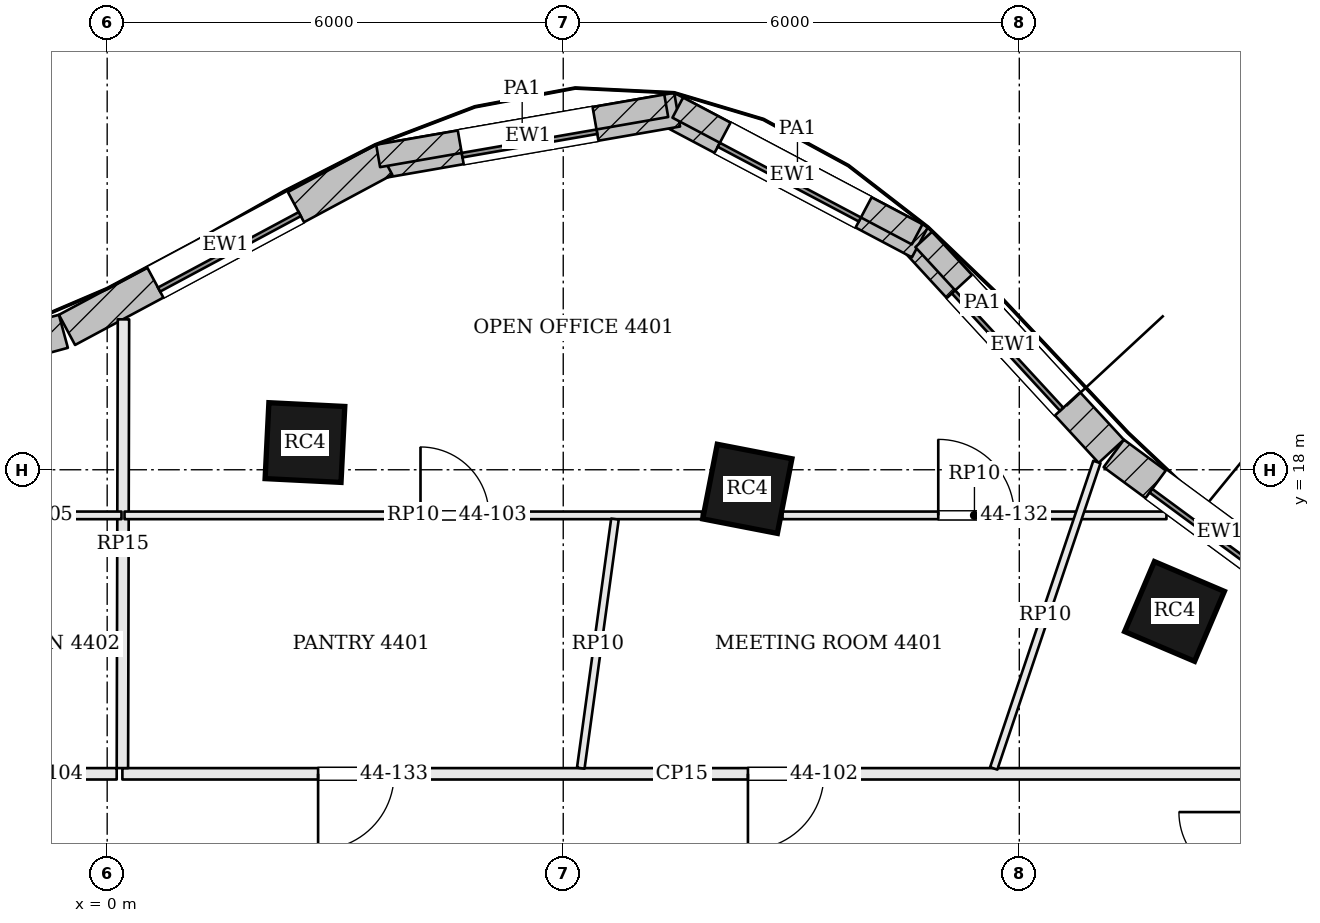
"""IFC4 building model, lengths in metres.
Left out: names, types, materials, properties, quantities, classifications, styles, units other than length and angle.
Written with IfcOpenShell. Run it as: python <this file> out.ifc"""

import sys

from ifc_helpers import new_model, si_unit, direction, frame, frame_2d, origin, origin_2d, place, context, subcontext, project, spatial, rectangle, extrude, element, fill, save


model = new_model("IFC4")
c1 = context("Model", 3, precision=1e-05, world=origin(), true_north=direction((0.0, 1.0)))
c2 = subcontext(c1, "Body", "Model", "MODEL_VIEW")
j1 = project(units=[si_unit("LENGTHUNIT", "METRE"), si_unit("PLANEANGLEUNIT", "RADIAN")], contexts=[c1])
p1 = place(None, origin())
s1 = spatial("IfcSite", under=j1, at=p1, CompositionType="ELEMENT")
p2 = place(p1, origin())
s2 = spatial("IfcBuilding", under=s1, at=p2, CompositionType="ELEMENT")
p3 = place(p2, frame((0.0, 0.0, 181.8)))
s3 = spatial("IfcBuildingStorey", under=s2, at=p3, CompositionType="ELEMENT", Elevation=181.8)
for number, where, z_axis, x_axis in (
    (1, (14.042, 16.136, 0.0), (0.0, 0.0, 1.0), (-0.92, 0.392, 0.0)),
    (2, (8.422, 17.749, 0.0), (0.0, 0.0, 1.0), (-0.982, 0.191, 0.0)),
    (3, (2.602, 18.358, 0.0), (0.0, 0.0, 1.0), (-0.999, 0.05, 0.0)),
):
    element("IfcColumn", number, at=place(p3, frame(where, z_axis=z_axis, x_axis=x_axis)), inside=s3, PredefinedType="COLUMN", context=c2, shape_type="SweptSolid", body=[
        extrude(rectangle(XDim=1.0, YDim=1.0, at=origin_2d()), origin(), (0.0, 0.0, 1.0), 3.9),
    ])
p4 = place(p3, frame((16.036, 16.158, 0.0), z_axis=(0.0, 0.0, 1.0), x_axis=(-0.805181432967, 0.593028549064, 0.0)))
e4 = element("IfcWall", 4, at=p4, inside=s3, PredefinedType="SOLIDWALL", context=c2, shape_type="SweptSolid", body=[
    extrude(rectangle(XDim=3.469, YDim=0.45, at=frame_2d((1.734, 0.0))), origin(), (0.0, 0.0, 1.0), 3.7),
])
p5 = place(p4, frame((0.684, 0.0, 0.9)))
e5 = element("IfcOpeningElement", 5, at=p5, cuts=e4, PredefinedType="OPENING", context=c2, shape_type="SweptSolid", body=[
    extrude(rectangle(XDim=2.1, YDim=2.3, at=frame_2d((1.05, 1.15))), frame((0.0, 0.235, 0.0), z_axis=(0.0, -1.0, 0.0), x_axis=(1.0, 0.0, 0.0)), (0.0, 0.0, 1.0), 0.47),
])
p6 = place(p3, frame((13.209, 18.243, 0.0), z_axis=(0.0, 0.0, 1.0), x_axis=(-0.677612152497, 0.735419452278, 0.0)))
e6 = element("IfcWall", 6, at=p6, inside=s3, PredefinedType="SOLIDWALL", context=c2, shape_type="SweptSolid", body=[
    extrude(rectangle(XDim=3.797, YDim=0.45, at=frame_2d((1.898, 0.0))), origin(), (0.0, 0.0, 1.0), 3.7),
])
p7 = place(p6, frame((0.848, 0.0, 0.9)))
e7 = element("IfcOpeningElement", 7, at=p7, cuts=e6, PredefinedType="OPENING", context=c2, shape_type="SweptSolid", body=[
    extrude(rectangle(XDim=2.1, YDim=2.3, at=frame_2d((1.05, 1.15))), frame((0.0, 0.235, 0.0), z_axis=(0.0, -1.0, 0.0), x_axis=(1.0, 0.0, 0.0)), (0.0, 0.0, 1.0), 0.47),
])
p8 = place(p3, frame((10.693, 20.993, 0.0), z_axis=(0.0, 0.0, 1.0), x_axis=(-0.883817790726, 0.46783128668, 0.0)))
e8 = element("IfcWall", 8, at=p8, inside=s3, PredefinedType="SOLIDWALL", context=c2, shape_type="SweptSolid", body=[
    extrude(rectangle(XDim=3.777, YDim=0.45, at=frame_2d((1.888, 0.0))), origin(), (0.0, 0.0, 1.0), 3.7),
])
p9 = place(p8, frame((0.838, 0.0, 0.9)))
e9 = element("IfcOpeningElement", 9, at=p9, cuts=e8, PredefinedType="OPENING", context=c2, shape_type="SweptSolid", body=[
    extrude(rectangle(XDim=2.1, YDim=2.3, at=frame_2d((1.05, 1.15))), frame((0.0, 0.235, 0.0), z_axis=(0.0, -1.0, 0.0), x_axis=(1.0, 0.0, 0.0)), (0.0, 0.0, 1.0), 0.47),
])
p10 = place(p3, frame((7.499, 22.737, 0.0), z_axis=(0.0, 0.0, 1.0), x_axis=(-0.98521220506, -0.171338585849, 0.0)))
e10 = element("IfcWall", 10, at=p10, inside=s3, PredefinedType="SOLIDWALL", context=c2, shape_type="SweptSolid", body=[
    extrude(rectangle(XDim=3.98, YDim=0.45, at=frame_2d((1.99, 0.0))), origin(), (0.0, 0.0, 1.0), 3.7),
])
p11 = place(p10, frame((1.09, 0.0, 0.9)))
e11 = element("IfcOpeningElement", 11, at=p11, cuts=e10, PredefinedType="OPENING", context=c2, shape_type="SweptSolid", body=[
    extrude(rectangle(XDim=1.8, YDim=2.3, at=frame_2d((0.9, 1.15))), frame((0.0, 0.235, 0.0), z_axis=(0.0, -1.0, 0.0), x_axis=(1.0, 0.0, 0.0)), (0.0, 0.0, 1.0), 0.47),
])
p12 = place(p3, frame((3.646, 22.079, 0.0), z_axis=(0.0, 0.0, 1.0), x_axis=(-0.881279133897, -0.472596115259, 0.0)))
e12 = element("IfcWall", 12, at=p12, inside=s3, PredefinedType="SOLIDWALL", context=c2, shape_type="SweptSolid", body=[
    extrude(rectangle(XDim=4.737, YDim=0.45, at=frame_2d((2.368, 0.0))), origin(), (0.0, 0.0, 1.0), 3.7),
])
p13 = place(p12, frame((1.318, 0.0, 0.9)))
e13 = element("IfcOpeningElement", 13, at=p13, cuts=e12, PredefinedType="OPENING", context=c2, shape_type="SweptSolid", body=[
    extrude(rectangle(XDim=2.1, YDim=2.3, at=frame_2d((1.05, 1.15))), frame((0.0, 0.235, 0.0), z_axis=(0.0, -1.0, 0.0), x_axis=(1.0, 0.0, 0.0)), (0.0, 0.0, 1.0), 0.47),
])
p14 = place(p3, frame((-0.576, 19.821, 0.0), z_axis=(0.0, 0.0, 1.0), x_axis=(-0.965009398019, -0.262215296532, 0.0)))
e14 = element("IfcWall", 14, at=p14, inside=s3, PredefinedType="SOLIDWALL", context=c2, shape_type="SweptSolid", body=[
    extrude(rectangle(XDim=2.565, YDim=0.45, at=frame_2d((1.283, 0.0))), origin(), (0.0, 0.0, 1.0), 3.7),
])
p15 = place(p14, frame((0.233, 0.0, 0.9)))
e15 = element("IfcOpeningElement", 15, at=p15, cuts=e14, PredefinedType="OPENING", context=c2, shape_type="SweptSolid", body=[
    extrude(rectangle(XDim=2.1, YDim=2.3, at=frame_2d((1.05, 1.15))), frame((0.0, 0.235, 0.0), z_axis=(0.0, -1.0, 0.0), x_axis=(1.0, 0.0, 0.0)), (0.0, 0.0, 1.0), 0.47),
])
p16 = place(p3, frame((12.288, 19.354, 3.9), z_axis=(0.0, 0.0, 1.0), x_axis=(-0.677603807485, 0.735427141246, 0.0)))
e16 = element("IfcWall", 16, at=p16, inside=s3, PredefinedType="PARAPET", context=c2, shape_type="SweptSolid", body=[
    extrude(rectangle(XDim=2.28, YDim=0.3, at=frame_2d((1.14, 0.0))), origin(), (0.0, 0.0, 1.0), 1.1),
])
p17 = place(p3, frame((10.656, 21.097, 3.9), z_axis=(0.0, 0.0, 1.0), x_axis=(-0.883797916666, 0.467868830439, 0.0)))
e17 = element("IfcWall", 17, at=p17, inside=s3, PredefinedType="PARAPET", context=c2, shape_type="SweptSolid", body=[
    extrude(rectangle(XDim=3.563, YDim=0.3, at=frame_2d((1.781, 0.0))), origin(), (0.0, 0.0, 1.0), 1.1),
])
p18 = place(p3, frame((7.355, 22.789, 3.9), z_axis=(0.0, 0.0, 1.0), x_axis=(-0.985201040548, -0.171402770404, 0.0)))
e18 = element("IfcWall", 18, at=p18, inside=s3, PredefinedType="PARAPET", context=c2, shape_type="SweptSolid", body=[
    extrude(rectangle(XDim=3.847, YDim=0.3, at=frame_2d((1.924, 0.0))), origin(), (0.0, 0.0, 1.0), 1.1),
])
p19 = place(p3, frame((14.925, 14.0, 0.0), z_axis=(0.0, 0.0, 1.0), x_axis=(-1.0, 0.0, 0.0)))
e19 = element("IfcWall", 19, at=p19, inside=s3, PredefinedType="PARTITIONING", context=c2, shape_type="SweptSolid", body=[
    extrude(rectangle(XDim=14.725, YDim=0.15, at=frame_2d((7.362, 0.0))), origin(), (0.0, 0.0, 1.0), 3.084),
])
p20 = place(p19, frame((5.495, 0.0, 0.0)))
e20 = element("IfcOpeningElement", 20, at=p20, cuts=e19, PredefinedType="OPENING", context=c2, shape_type="SweptSolid", body=[
    extrude(rectangle(XDim=1.0, YDim=2.4, at=frame_2d((0.5, 1.2))), frame((0.0, 0.085, 0.0), z_axis=(0.0, -1.0, 0.0), x_axis=(1.0, 0.0, 0.0)), (0.0, 0.0, 1.0), 0.17),
])
p21 = place(p19, frame((11.15, 0.0, 0.0)))
e21 = element("IfcOpeningElement", 21, at=p21, cuts=e19, PredefinedType="OPENING", context=c2, shape_type="SweptSolid", body=[
    extrude(rectangle(XDim=1.0, YDim=2.1, at=frame_2d((0.5, 1.05))), frame((0.0, 0.085, 0.0), z_axis=(0.0, -1.0, 0.0), x_axis=(1.0, 0.0, 0.0)), (0.0, 0.0, 1.0), 0.17),
])
p22 = place(p3, frame((0.214, 19.979, 0.0), z_axis=(0.0, 0.0, 1.0), x_axis=(-0.002357118586, -0.999997221992, 0.0)))
e22 = element("IfcWall", 22, at=p22, inside=s3, PredefinedType="PARTITIONING", context=c2, shape_type="SweptSolid", body=[
    extrude(rectangle(XDim=5.904, YDim=0.15, at=frame_2d((2.952, 0.0))), origin(), (0.0, 0.0, 1.0), 3.234),
])
p23 = place(p3, frame((0.125, 14.0, 0.0), z_axis=(0.0, 0.0, 1.0), x_axis=(-1.0, 0.0, 0.0)))
e23 = element("IfcWall", 23, at=p23, inside=s3, PredefinedType="PARTITIONING", context=c2, shape_type="SweptSolid", body=[
    extrude(rectangle(XDim=15.125, YDim=0.15, at=frame_2d((7.562, 0.0))), origin(), (0.0, 0.0, 1.0), 3.084),
])
p24 = place(p23, frame((0.888, 0.0, 0.0)))
e24 = element("IfcOpeningElement", 24, at=p24, cuts=e23, PredefinedType="OPENING", context=c2, shape_type="SweptSolid", body=[
    extrude(rectangle(XDim=1.0, YDim=2.1, at=frame_2d((0.5, 1.05))), frame((0.0, 0.085, 0.0), z_axis=(0.0, -1.0, 0.0), x_axis=(1.0, 0.0, 0.0)), (0.0, 0.0, 1.0), 0.17),
])
p25 = place(p23, frame((4.005, 0.0, 0.0)))
e25 = element("IfcOpeningElement", 25, at=p25, cuts=e23, PredefinedType="OPENING", context=c2, shape_type="SweptSolid", body=[
    extrude(rectangle(XDim=1.0, YDim=2.4, at=frame_2d((0.5, 1.2))), frame((0.0, 0.085, 0.0), z_axis=(0.0, -1.0, 0.0), x_axis=(1.0, 0.0, 0.0)), (0.0, 0.0, 1.0), 0.17),
])
p26 = place(p23, frame((7.307, 0.0, 0.0)))
e26 = element("IfcOpeningElement", 26, at=p26, cuts=e23, PredefinedType="OPENING", context=c2, shape_type="SweptSolid", body=[
    extrude(rectangle(XDim=1.0, YDim=2.4, at=frame_2d((0.5, 1.2))), frame((0.0, 0.085, 0.0), z_axis=(0.0, -1.0, 0.0), x_axis=(1.0, 0.0, 0.0)), (0.0, 0.0, 1.0), 0.17),
])
p27 = place(p3, frame((0.228, 17.4, 0.0), z_axis=(0.0, 0.0, 1.0), x_axis=(1.0, 0.0, 0.0)))
e27 = element("IfcWall", 27, at=p27, inside=s3, PredefinedType="PARTITIONING", context=c2, shape_type="SweptSolid", body=[
    extrude(rectangle(XDim=7.596, YDim=0.1, at=frame_2d((3.798, 0.0))), origin(), (0.0, 0.0, 1.0), 3.084),
])
p28 = place(p27, frame((3.894, 0.0, 0.0)))
e28 = element("IfcOpeningElement", 28, at=p28, cuts=e27, PredefinedType="OPENING", context=c2, shape_type="SweptSolid", body=[
    extrude(rectangle(XDim=0.9, YDim=2.1, at=frame_2d((0.45, 1.05))), frame((0.0, 0.06, 0.0), z_axis=(0.0, -1.0, 0.0), x_axis=(1.0, 0.0, 0.0)), (0.0, 0.0, 1.0), 0.12),
])
p29 = place(p3, frame((8.884, 17.4, 0.0), z_axis=(0.0, 0.0, 1.0), x_axis=(1.0, 0.0, 0.0)))
e29 = element("IfcWall", 29, at=p29, inside=s3, PredefinedType="PARTITIONING", context=c2, shape_type="SweptSolid", body=[
    extrude(rectangle(XDim=5.052, YDim=0.1, at=frame_2d((2.526, 0.0))), origin(), (0.0, 0.0, 1.0), 3.084),
])
p30 = place(p29, frame((2.05, 0.0, 0.0)))
e30 = element("IfcOpeningElement", 30, at=p30, cuts=e29, PredefinedType="OPENING", context=c2, shape_type="SweptSolid", body=[
    extrude(rectangle(XDim=1.0, YDim=2.4, at=frame_2d((0.5, 1.2))), frame((0.0, 0.06, 0.0), z_axis=(0.0, -1.0, 0.0), x_axis=(1.0, 0.0, 0.0)), (0.0, 0.0, 1.0), 0.12),
])
p31 = place(p3, frame((11.664, 14.071, 0.0), z_axis=(0.0, 0.0, 1.0), x_axis=(0.319050122348, 0.947737843198, 0.0)))
e31 = element("IfcWall", 31, at=p31, inside=s3, PredefinedType="PARTITIONING", context=c2, shape_type="SweptSolid", body=[
    extrude(rectangle(XDim=4.254, YDim=0.1, at=frame_2d((2.127, 0.0))), origin(), (0.0, 0.0, 1.0), 3.084),
])
p32 = place(p3, frame((6.231, 14.074, 0.0), z_axis=(0.0, 0.0, 1.0), x_axis=(0.135982862237, 0.990711189589, 0.0)))
e32 = element("IfcWall", 32, at=p32, inside=s3, PredefinedType="PARTITIONING", context=c2, shape_type="SweptSolid", body=[
    extrude(rectangle(XDim=3.307, YDim=0.1, at=frame_2d((1.654, 0.0))), origin(), (0.0, 0.0, 1.0), 3.084),
])
p33 = place(p3, frame((-8.483, 17.4, 0.0), z_axis=(0.0, 0.0, 1.0), x_axis=(1.0, 0.0, 0.0)))
e33 = element("IfcWall", 33, at=p33, inside=s3, PredefinedType="PARTITIONING", context=c2, shape_type="SweptSolid", body=[
    extrude(rectangle(XDim=8.671, YDim=0.1, at=frame_2d((4.335, 0.0))), origin(), (0.0, 0.0, 1.0), 3.084),
])
p34 = place(p33, frame((6.582, 0.0, 0.0)))
e34 = element("IfcOpeningElement", 34, at=p34, cuts=e33, PredefinedType="OPENING", context=c2, shape_type="SweptSolid", body=[
    extrude(rectangle(XDim=1.0, YDim=2.1, at=frame_2d((0.5, 1.05))), frame((0.0, 0.06, 0.0), z_axis=(0.0, -1.0, 0.0), x_axis=(1.0, 0.0, 0.0)), (0.0, 0.0, 1.0), 0.12),
])
p35 = place(p5, origin())
e35 = element("IfcWindow", 35, at=p35, inside=s3, PartitioningType="SINGLE_PANEL", PredefinedType="WINDOW", context=c2, shape_type="SweptSolid", body=[
    extrude(rectangle(XDim=2.1, YDim=2.3, at=frame_2d((1.05, 1.15))), frame((0.0, 0.135, 0.0), z_axis=(0.0, -1.0, 0.0), x_axis=(1.0, 0.0, 0.0)), (0.0, 0.0, 1.0), 0.06),
])
fill(e5, e35)
p36 = place(p7, origin())
e36 = element("IfcWindow", 36, at=p36, inside=s3, PartitioningType="SINGLE_PANEL", PredefinedType="WINDOW", context=c2, shape_type="SweptSolid", body=[
    extrude(rectangle(XDim=2.1, YDim=2.3, at=frame_2d((1.05, 1.15))), frame((0.0, 0.135, 0.0), z_axis=(0.0, -1.0, 0.0), x_axis=(1.0, 0.0, 0.0)), (0.0, 0.0, 1.0), 0.06),
])
fill(e7, e36)
p37 = place(p9, origin())
e37 = element("IfcWindow", 37, at=p37, inside=s3, PartitioningType="SINGLE_PANEL", PredefinedType="WINDOW", context=c2, shape_type="SweptSolid", body=[
    extrude(rectangle(XDim=2.1, YDim=2.3, at=frame_2d((1.05, 1.15))), frame((0.0, 0.135, 0.0), z_axis=(0.0, -1.0, 0.0), x_axis=(1.0, 0.0, 0.0)), (0.0, 0.0, 1.0), 0.06),
])
fill(e9, e37)
p38 = place(p11, origin())
e38 = element("IfcWindow", 38, at=p38, inside=s3, PartitioningType="SINGLE_PANEL", PredefinedType="WINDOW", context=c2, shape_type="SweptSolid", body=[
    extrude(rectangle(XDim=1.8, YDim=2.3, at=frame_2d((0.9, 1.15))), frame((0.0, 0.135, 0.0), z_axis=(0.0, -1.0, 0.0), x_axis=(1.0, 0.0, 0.0)), (0.0, 0.0, 1.0), 0.06),
])
fill(e11, e38)
p39 = place(p13, origin())
e39 = element("IfcWindow", 39, at=p39, inside=s3, PartitioningType="SINGLE_PANEL", PredefinedType="WINDOW", context=c2, shape_type="SweptSolid", body=[
    extrude(rectangle(XDim=2.1, YDim=2.3, at=frame_2d((1.05, 1.15))), frame((0.0, 0.135, 0.0), z_axis=(0.0, -1.0, 0.0), x_axis=(1.0, 0.0, 0.0)), (0.0, 0.0, 1.0), 0.06),
])
fill(e13, e39)
p40 = place(p20, origin())
e40 = element("IfcDoor", 40, at=p40, inside=s3, OperationType="SINGLE_SWING_RIGHT", PredefinedType="DOOR", context=c2, shape_type="SweptSolid", body=[
    extrude(rectangle(XDim=1.0, YDim=2.4, at=frame_2d((0.5, 1.2))), frame((0.0, 0.025, 0.0), z_axis=(0.0, -1.0, 0.0), x_axis=(1.0, 0.0, 0.0)), (0.0, 0.0, 1.0), 0.05),
])
fill(e20, e40)
p41 = place(p28, origin())
e41 = element("IfcDoor", 41, at=p41, inside=s3, OperationType="SINGLE_SWING_LEFT", PredefinedType="DOOR", context=c2, shape_type="SweptSolid", body=[
    extrude(rectangle(XDim=0.9, YDim=2.1, at=frame_2d((0.45, 1.05))), frame((0.0, 0.025, 0.0), z_axis=(0.0, -1.0, 0.0), x_axis=(1.0, 0.0, 0.0)), (0.0, 0.0, 1.0), 0.05),
])
fill(e28, e41)
p42 = place(p30, origin())
e42 = element("IfcDoor", 42, at=p42, inside=s3, OperationType="SINGLE_SWING_LEFT", PredefinedType="DOOR", context=c2, shape_type="SweptSolid", body=[
    extrude(rectangle(XDim=1.0, YDim=2.4, at=frame_2d((0.5, 1.2))), frame((0.0, 0.025, 0.0), z_axis=(0.0, -1.0, 0.0), x_axis=(1.0, 0.0, 0.0)), (0.0, 0.0, 1.0), 0.05),
])
fill(e30, e42)
p43 = place(p21, origin())
e43 = element("IfcDoor", 43, at=p43, inside=s3, OperationType="SINGLE_SWING_RIGHT", PredefinedType="DOOR", context=c2, shape_type="SweptSolid", body=[
    extrude(rectangle(XDim=1.0, YDim=2.1, at=frame_2d((0.5, 1.05))), frame((0.0, 0.025, 0.0), z_axis=(0.0, -1.0, 0.0), x_axis=(1.0, 0.0, 0.0)), (0.0, 0.0, 1.0), 0.05),
])
fill(e21, e43)
save(model, sys.argv[1])
